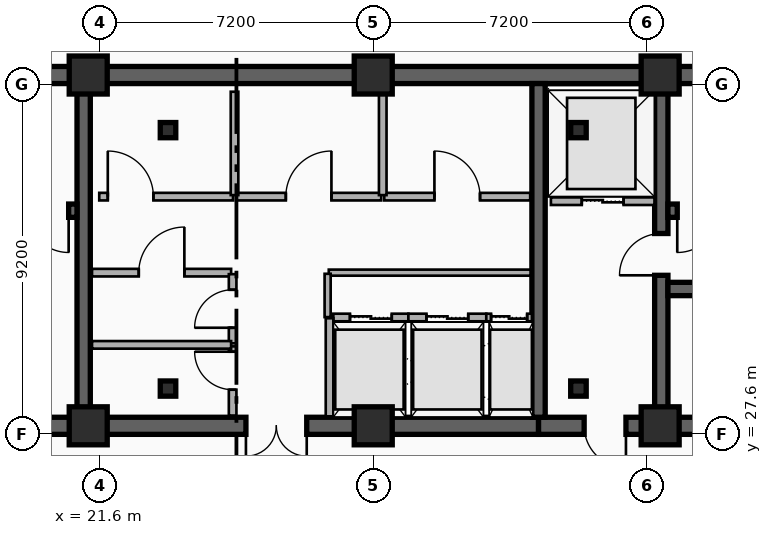
"""IFC4 building model, lengths in metres.
Left out: names, types, materials, properties, quantities, classifications, styles, units other than length and angle.
Written with IfcOpenShell. Run it as: python <this file> out.ifc"""

import sys

from ifc_helpers import new_model, si_unit, direction, frame, frame_2d, origin, origin_2d, place, context, subcontext, project, spatial, rectangle, i_section, extrude, element, fill, save


model = new_model("IFC4")
c1 = context("Model", 3, precision=1e-05, world=origin(), true_north=direction((0.0, 1.0)))
c2 = subcontext(c1, "Body", "Model", "MODEL_VIEW")
j1 = project(units=[si_unit("LENGTHUNIT", "METRE"), si_unit("PLANEANGLEUNIT", "RADIAN")], contexts=[c1])
p1 = place(None, origin())
s1 = spatial("IfcSite", under=j1, at=p1, CompositionType="ELEMENT")
p2 = place(p1, origin())
s2 = spatial("IfcBuilding", under=s1, at=p2, CompositionType="ELEMENT")
p3 = place(p2, frame((0.0, 0.0, 222.0)))
s3 = spatial("IfcBuildingStorey", under=s2, at=p3, CompositionType="ELEMENT", Elevation=222.0)
p4 = place(p3, frame((12.15, 37.05, 0.0), z_axis=(0.0, 0.0, 1.0), x_axis=(1.0, 0.0, 0.0)))
e1 = element("IfcWall", 1, at=p4, inside=s3, PredefinedType="SHEAR", context=c2, shape_type="SweptSolid", body=[
    extrude(rectangle(XDim=33.23, YDim=0.45, at=frame_2d((16.615, 0.0))), origin(), (0.0, 0.0, 1.0), 3.6),
])
p5 = place(p3, frame((21.18, 27.82, 0.0), z_axis=(0.0, 0.0, 1.0), x_axis=(-1.0, 0.0, 0.0)))
e2 = element("IfcWall", 2, at=p5, inside=s3, PredefinedType="SHEAR", context=c2, shape_type="SweptSolid", body=[
    extrude(rectangle(XDim=9.03, YDim=0.45, at=frame_2d((4.515, 0.0))), origin(), (0.0, 0.0, 1.0), 3.6),
])
p6 = place(p5, frame((2.68, 0.0, 0.0)))
e3 = element("IfcOpeningElement", 3, at=p6, cuts=e2, PredefinedType="OPENING", context=c2, shape_type="SweptSolid", body=[
    extrude(rectangle(XDim=1.1, YDim=2.15, at=frame_2d((0.55, 1.075))), frame((0.0, 0.235, 0.0), z_axis=(0.0, -1.0, 0.0), x_axis=(1.0, 0.0, 0.0)), (0.0, 0.0, 1.0), 0.47),
])
p7 = place(p3, frame((33.15, 27.82, 0.0), z_axis=(0.0, 0.0, 1.0), x_axis=(-1.0, 0.0, 0.0)))
e4 = element("IfcWall", 4, at=p7, inside=s3, PredefinedType="SHEAR", context=c2, shape_type="SweptSolid", body=[
    extrude(rectangle(XDim=11.97, YDim=0.45, at=frame_2d((5.985, 0.0))), origin(), (0.0, 0.0, 1.0), 3.6),
])
p8 = place(p7, frame((6.1, 0.0, 0.0)))
e5 = element("IfcOpeningElement", 5, at=p8, cuts=e4, PredefinedType="OPENING", context=c2, shape_type="SweptSolid", body=[
    extrude(rectangle(XDim=1.6, YDim=2.2, at=frame_2d((0.8, 1.1))), frame((0.0, 0.235, 0.0), z_axis=(0.0, -1.0, 0.0), x_axis=(1.0, 0.0, 0.0)), (0.0, 0.0, 1.0), 0.47),
])
p9 = place(p3, frame((45.38, 27.82, 0.0), z_axis=(0.0, 0.0, 1.0), x_axis=(-1.0, 0.0, 0.0)))
e6 = element("IfcWall", 6, at=p9, inside=s3, PredefinedType="SHEAR", context=c2, shape_type="SweptSolid", body=[
    extrude(rectangle(XDim=12.23, YDim=0.45, at=frame_2d((6.115, 0.0))), origin(), (0.0, 0.0, 1.0), 3.6),
])
p10 = place(p9, frame((9.93, 0.0, 0.0)))
e7 = element("IfcOpeningElement", 7, at=p10, cuts=e6, PredefinedType="OPENING", context=c2, shape_type="SweptSolid", body=[
    extrude(rectangle(XDim=1.1, YDim=2.15, at=frame_2d((0.55, 1.075))), frame((0.0, 0.235, 0.0), z_axis=(0.0, -1.0, 0.0), x_axis=(1.0, 0.0, 0.0)), (0.0, 0.0, 1.0), 0.47),
])
p11 = place(p9, frame((6.23, 0.0, 0.0)))
e8 = element("IfcOpeningElement", 8, at=p11, cuts=e6, PredefinedType="OPENING", context=c2, shape_type="SweptSolid", body=[
    extrude(rectangle(XDim=1.1, YDim=2.15, at=frame_2d((0.55, 1.075))), frame((0.0, 0.235, 0.0), z_axis=(0.0, -1.0, 0.0), x_axis=(1.0, 0.0, 0.0)), (0.0, 0.0, 1.0), 0.47),
])
for number, where, z_axis, x_axis in (
    (9, (21.18, 28.045, 0.0), (0.0, 0.0, 1.0), (0.0, 1.0, 0.0)),
    (10, (33.15, 28.045, 0.0), (0.0, 0.0, 1.0), (0.0, 1.0, 0.0)),
):
    element("IfcWall", number, at=place(p3, frame(where, z_axis=z_axis, x_axis=x_axis)), inside=s3, PredefinedType="SHEAR", context=c2, shape_type="SweptSolid", body=[
        extrude(rectangle(XDim=8.78, YDim=0.35, at=frame_2d((4.39, 0.0))), origin(), (0.0, 0.0, 1.0), 3.6),
    ])
p12 = place(p3, frame((36.38, 28.045, 0.0), z_axis=(0.0, 0.0, 1.0), x_axis=(0.0, 1.0, 0.0)))
e11 = element("IfcWall", 11, at=p12, inside=s3, PredefinedType="SHEAR", context=c2, shape_type="SweptSolid", body=[
    extrude(rectangle(XDim=8.78, YDim=0.35, at=frame_2d((4.39, 0.0))), origin(), (0.0, 0.0, 1.0), 3.6),
])
p13 = place(p12, frame((3.735, 0.0, 0.0)))
e12 = element("IfcOpeningElement", 12, at=p13, cuts=e11, PredefinedType="OPENING", context=c2, shape_type="SweptSolid", body=[
    extrude(rectangle(XDim=1.1, YDim=2.15, at=frame_2d((0.55, 1.075))), frame((0.0, 0.185, 0.0), z_axis=(0.0, -1.0, 0.0), x_axis=(1.0, 0.0, 0.0)), (0.0, 0.0, 1.0), 0.37),
])
p14 = place(p3, frame((21.005, 33.48, 0.0), z_axis=(0.0, 0.0, 1.0), x_axis=(-1.0, 0.0, 0.0)))
e13 = element("IfcWall", 13, at=p14, inside=s3, PredefinedType="SHEAR", context=c2, shape_type="SweptSolid", body=[
    extrude(rectangle(XDim=8.63, YDim=0.35, at=frame_2d((4.315, 0.0))), origin(), (0.0, 0.0, 1.0), 3.6),
])
p15 = place(p14, frame((0.22, 0.0, 0.0)))
e14 = element("IfcOpeningElement", 14, at=p15, cuts=e13, PredefinedType="OPENING", context=c2, shape_type="SweptSolid", body=[
    extrude(rectangle(XDim=1.1, YDim=2.15, at=frame_2d((0.55, 1.075))), frame((0.0, 0.185, 0.0), z_axis=(0.0, -1.0, 0.0), x_axis=(1.0, 0.0, 0.0)), (0.0, 0.0, 1.0), 0.37),
])
p16 = place(p3, frame((45.155, 33.48, 0.0), z_axis=(0.0, 0.0, 1.0), x_axis=(-1.0, 0.0, 0.0)))
e15 = element("IfcWall", 15, at=p16, inside=s3, PredefinedType="SHEAR", context=c2, shape_type="SweptSolid", body=[
    extrude(rectangle(XDim=8.6, YDim=0.35, at=frame_2d((4.3, 0.0))), origin(), (0.0, 0.0, 1.0), 3.6),
])
p17 = place(p16, frame((7.255, 0.0, 0.0)))
e16 = element("IfcOpeningElement", 16, at=p17, cuts=e15, PredefinedType="OPENING", context=c2, shape_type="SweptSolid", body=[
    extrude(rectangle(XDim=1.1, YDim=2.15, at=frame_2d((0.55, 1.075))), frame((0.0, 0.185, 0.0), z_axis=(0.0, -1.0, 0.0), x_axis=(1.0, 0.0, 0.0)), (0.0, 0.0, 1.0), 0.37),
])
p18 = place(p3, frame((36.555, 31.42, 0.0), z_axis=(0.0, 0.0, 1.0), x_axis=(1.0, 0.0, 0.0)))
e17 = element("IfcWall", 17, at=p18, inside=s3, PredefinedType="SHEAR", context=c2, shape_type="SweptSolid", body=[
    extrude(rectangle(XDim=8.6, YDim=0.35, at=frame_2d((4.3, 0.0))), origin(), (0.0, 0.0, 1.0), 3.6),
])
for number, where, z_axis, x_axis in (
    (18, (23.4, 28.8, 0.0), (0.0, 0.0, 1.0), (1.0, 0.0, 0.0)),
    (19, (34.2, 28.8, 0.0), (0.0, 0.0, 1.0), (1.0, 0.0, 0.0)),
    (20, (34.2, 35.6, 0.0), (0.0, 0.0, 1.0), (1.0, 0.0, 0.0)),
    (21, (23.4, 35.6, 0.0), (0.0, 0.0, 1.0), (1.0, 0.0, 0.0)),
):
    element("IfcColumn", number, at=place(p3, frame(where, z_axis=z_axis, x_axis=x_axis)), inside=s3, PredefinedType="COLUMN", context=c2, shape_type="SweptSolid", body=[
        extrude(i_section(OverallWidth=0.408, OverallDepth=0.4, WebThickness=0.025, FlangeThickness=0.039, FilletRadius=0.015, at=origin_2d()), origin(), (0.0, 0.0, 1.0), 3.6),
    ])
for number, where, z_axis, x_axis in (
    (22, (21.3, 27.82, 0.0), (0.0, 0.0, 1.0), (1.0, 0.0, 0.0)),
    (23, (21.3, 37.05, 0.0), (0.0, 0.0, 1.0), (1.0, 0.0, 0.0)),
    (24, (28.8, 27.82, 0.0), (0.0, 0.0, 1.0), (1.0, 0.0, 0.0)),
    (25, (28.8, 37.05, 0.0), (0.0, 0.0, 1.0), (1.0, 0.0, 0.0)),
    (26, (36.35, 27.82, 0.0), (0.0, 0.0, 1.0), (1.0, 0.0, 0.0)),
    (27, (36.35, 37.05, 0.0), (0.0, 0.0, 1.0), (1.0, 0.0, 0.0)),
):
    element("IfcColumn", number, at=place(p3, frame(where, z_axis=z_axis, x_axis=x_axis)), inside=s3, PredefinedType="COLUMN", context=c2, shape_type="SweptSolid", body=[
        extrude(rectangle(XDim=1.0, YDim=1.0, at=origin_2d()), origin(), (0.0, 0.0, 1.0), 3.6),
    ])
p19 = place(p3, frame((33.475, 33.73, 0.0), z_axis=(0.0, 0.0, 1.0), x_axis=(1.0, 0.0, 0.0)))
e28 = element("IfcWall", 28, at=p19, inside=s3, PredefinedType="PARTITIONING", context=c2, shape_type="SweptSolid", body=[
    extrude(rectangle(XDim=2.725, YDim=0.2, at=frame_2d((1.362, 0.0))), origin(), (0.0, 0.0, 1.0), 2.41),
])
p20 = place(p19, frame((0.812, 0.0, 0.0)))
e29 = element("IfcOpeningElement", 29, at=p20, cuts=e28, PredefinedType="OPENING", context=c2, shape_type="SweptSolid", body=[
    extrude(rectangle(XDim=1.1, YDim=2.15, at=frame_2d((0.55, 1.075))), frame((0.0, 0.11, 0.0), z_axis=(0.0, -1.0, 0.0), x_axis=(1.0, 0.0, 0.0)), (0.0, 0.0, 1.0), 0.22),
])
p21 = place(p3, frame((27.75, 30.67, 0.0), z_axis=(0.0, 0.0, 1.0), x_axis=(1.0, 0.0, 0.0)))
e30 = element("IfcWall", 30, at=p21, inside=s3, PredefinedType="PARTITIONING", context=c2, shape_type="SweptSolid", body=[
    extrude(rectangle(XDim=1.975, YDim=0.2, at=frame_2d((0.988, 0.0))), origin(), (0.0, 0.0, 1.0), 2.41),
])
p22 = place(p21, frame((0.438, 0.0, 0.0)))
e31 = element("IfcOpeningElement", 31, at=p22, cuts=e30, PredefinedType="OPENING", context=c2, shape_type="SweptSolid", body=[
    extrude(rectangle(XDim=1.1, YDim=2.15, at=frame_2d((0.55, 1.075))), frame((0.0, 0.11, 0.0), z_axis=(0.0, -1.0, 0.0), x_axis=(1.0, 0.0, 0.0)), (0.0, 0.0, 1.0), 0.22),
])
p23 = place(p3, frame((27.65, 28.07, 0.0), z_axis=(0.0, 0.0, 1.0), x_axis=(0.0, 1.0, 0.0)))
e32 = element("IfcWall", 32, at=p23, inside=s3, PredefinedType="PARTITIONING", context=c2, shape_type="SweptSolid", body=[
    extrude(rectangle(XDim=2.58, YDim=0.2, at=frame_2d((1.29, 0.0))), origin(), (0.0, 0.0, 1.0), 2.41),
])
p24 = place(p3, frame((29.725, 30.67, 0.0), z_axis=(0.0, 0.0, 1.0), x_axis=(1.0, 0.0, 0.0)))
e33 = element("IfcWall", 33, at=p24, inside=s3, PredefinedType="PARTITIONING", context=c2, shape_type="SweptSolid", body=[
    extrude(rectangle(XDim=2.05, YDim=0.2, at=frame_2d((1.025, 0.0))), origin(), (0.0, 0.0, 1.0), 2.72),
])
p25 = place(p24, frame((0.475, 0.0, 0.0)))
e34 = element("IfcOpeningElement", 34, at=p25, cuts=e33, PredefinedType="OPENING", context=c2, shape_type="SweptSolid", body=[
    extrude(rectangle(XDim=1.1, YDim=2.15, at=frame_2d((0.55, 1.075))), frame((0.0, 0.11, 0.0), z_axis=(0.0, -1.0, 0.0), x_axis=(1.0, 0.0, 0.0)), (0.0, 0.0, 1.0), 0.22),
])
p26 = place(p3, frame((31.775, 30.67, 0.0), z_axis=(0.0, 0.0, 1.0), x_axis=(1.0, 0.0, 0.0)))
e35 = element("IfcWall", 35, at=p26, inside=s3, PredefinedType="PARTITIONING", context=c2, shape_type="SweptSolid", body=[
    extrude(rectangle(XDim=1.2, YDim=0.2, at=frame_2d((0.6, 0.0))), origin(), (0.0, 0.0, 1.0), 2.72),
])
p27 = place(p26, frame((0.125, 0.0, 0.0)))
e36 = element("IfcOpeningElement", 36, at=p27, cuts=e35, PredefinedType="OPENING", context=c2, shape_type="SweptSolid", body=[
    extrude(rectangle(XDim=0.95, YDim=2.15, at=frame_2d((0.475, 1.075))), frame((0.0, 0.11, 0.0), z_axis=(0.0, -1.0, 0.0), x_axis=(1.0, 0.0, 0.0)), (0.0, 0.0, 1.0), 0.22),
])
p28 = place(p3, frame((21.4, 31.85, 0.0), z_axis=(0.0, 0.0, 1.0), x_axis=(1.0, 0.0, 0.0)))
e37 = element("IfcWall", 37, at=p28, inside=s3, PredefinedType="PARTITIONING", context=c2, shape_type="SweptSolid", body=[
    extrude(rectangle(XDim=3.66, YDim=0.2, at=frame_2d((1.83, 0.0))), origin(), (0.0, 0.0, 1.0), 2.41),
])
p29 = place(p28, frame((1.23, 0.0, 0.0)))
e38 = element("IfcOpeningElement", 38, at=p29, cuts=e37, PredefinedType="OPENING", context=c2, shape_type="SweptSolid", body=[
    extrude(rectangle(XDim=1.2, YDim=2.15, at=frame_2d((0.6, 1.075))), frame((0.0, 0.11, 0.0), z_axis=(0.0, -1.0, 0.0), x_axis=(1.0, 0.0, 0.0)), (0.0, 0.0, 1.0), 0.22),
])
p30 = place(p3, frame((21.59, 33.85, 0.0), z_axis=(0.0, 0.0, 1.0), x_axis=(1.0, 0.0, 0.0)))
e39 = element("IfcWall", 39, at=p30, inside=s3, PredefinedType="PARTITIONING", context=c2, shape_type="SweptSolid", body=[
    extrude(rectangle(XDim=3.52, YDim=0.2, at=frame_2d((1.76, 0.0))), origin(), (0.0, 0.0, 1.0), 2.41),
])
p31 = place(p30, frame((0.225, 0.0, 0.0)))
e40 = element("IfcOpeningElement", 40, at=p31, cuts=e39, PredefinedType="OPENING", context=c2, shape_type="SweptSolid", body=[
    extrude(rectangle(XDim=1.2, YDim=2.15, at=frame_2d((0.6, 1.075))), frame((0.0, 0.11, 0.0), z_axis=(0.0, -1.0, 0.0), x_axis=(1.0, 0.0, 0.0)), (0.0, 0.0, 1.0), 0.22),
])
p32 = place(p3, frame((25.19, 33.85, 0.0), z_axis=(0.0, 0.0, 1.0), x_axis=(1.0, 0.0, 0.0)))
e41 = element("IfcWall", 41, at=p32, inside=s3, PredefinedType="PARTITIONING", context=c2, shape_type="SweptSolid", body=[
    extrude(rectangle(XDim=3.82, YDim=0.2, at=frame_2d((1.91, 0.0))), origin(), (0.0, 0.0, 1.0), 2.41),
])
p33 = place(p32, frame((1.31, 0.0, 0.0)))
e42 = element("IfcOpeningElement", 42, at=p33, cuts=e41, PredefinedType="OPENING", context=c2, shape_type="SweptSolid", body=[
    extrude(rectangle(XDim=1.2, YDim=2.15, at=frame_2d((0.6, 1.075))), frame((0.0, 0.11, 0.0), z_axis=(0.0, -1.0, 0.0), x_axis=(1.0, 0.0, 0.0)), (0.0, 0.0, 1.0), 0.22),
])
p34 = place(p3, frame((29.09, 33.85, 0.0), z_axis=(0.0, 0.0, 1.0), x_axis=(1.0, 0.0, 0.0)))
e43 = element("IfcWall", 43, at=p34, inside=s3, PredefinedType="PARTITIONING", context=c2, shape_type="SweptSolid", body=[
    extrude(rectangle(XDim=3.84, YDim=0.2, at=frame_2d((1.92, 0.0))), origin(), (0.0, 0.0, 1.0), 2.41),
])
p35 = place(p34, frame((1.32, 0.0, 0.0)))
e44 = element("IfcOpeningElement", 44, at=p35, cuts=e43, PredefinedType="OPENING", context=c2, shape_type="SweptSolid", body=[
    extrude(rectangle(XDim=1.2, YDim=2.15, at=frame_2d((0.6, 1.075))), frame((0.0, 0.11, 0.0), z_axis=(0.0, -1.0, 0.0), x_axis=(1.0, 0.0, 0.0)), (0.0, 0.0, 1.0), 0.22),
])
p36 = place(p3, frame((25.1, 28.09, 0.0), z_axis=(0.0, 0.0, 1.0), x_axis=(0.0, 1.0, 0.0)))
e45 = element("IfcWall", 45, at=p36, inside=s3, PredefinedType="PARTITIONING", context=c2, shape_type="SweptSolid", body=[
    extrude(rectangle(XDim=1.82, YDim=0.2, at=frame_2d((0.91, 0.0))), origin(), (0.0, 0.0, 1.0), 2.72),
])
p37 = place(p36, frame((0.68, 0.0, 0.0)))
e46 = element("IfcOpeningElement", 46, at=p37, cuts=e45, PredefinedType="OPENING", context=c2, shape_type="SweptSolid", body=[
    extrude(rectangle(XDim=1.0, YDim=2.15, at=frame_2d((0.5, 1.075))), frame((0.0, 0.11, 0.0), z_axis=(0.0, -1.0, 0.0), x_axis=(1.0, 0.0, 0.0)), (0.0, 0.0, 1.0), 0.22),
])
p38 = place(p3, frame((25.1, 29.99, 0.0), z_axis=(0.0, 0.0, 1.0), x_axis=(0.0, 1.0, 0.0)))
e47 = element("IfcWall", 47, at=p38, inside=s3, PredefinedType="PARTITIONING", context=c2, shape_type="SweptSolid", body=[
    extrude(rectangle(XDim=1.82, YDim=0.2, at=frame_2d((0.91, 0.0))), origin(), (0.0, 0.0, 1.0), 3.34),
])
p39 = place(p38, frame((0.41, 0.0, 0.0)))
e48 = element("IfcOpeningElement", 48, at=p39, cuts=e47, PredefinedType="OPENING", context=c2, shape_type="SweptSolid", body=[
    extrude(rectangle(XDim=1.0, YDim=2.15, at=frame_2d((0.5, 1.075))), frame((0.0, 0.11, 0.0), z_axis=(0.0, -1.0, 0.0), x_axis=(1.0, 0.0, 0.0)), (0.0, 0.0, 1.0), 0.22),
])
p40 = place(p3, frame((21.4, 29.95, 0.0), z_axis=(0.0, 0.0, 1.0), x_axis=(1.0, 0.0, 0.0)))
e49 = element("IfcWall", 49, at=p40, inside=s3, PredefinedType="PARTITIONING", context=c2, shape_type="SweptSolid", body=[
    extrude(rectangle(XDim=3.66, YDim=0.2, at=frame_2d((1.83, 0.0))), origin(), (0.0, 0.0, 1.0), 2.41),
])
p41 = place(p3, frame((25.15, 33.89, 0.0), z_axis=(0.0, 0.0, 1.0), x_axis=(0.0, 1.0, 0.0)))
e50 = element("IfcWall", 50, at=p41, inside=s3, PredefinedType="PARTITIONING", context=c2, shape_type="SweptSolid", body=[
    extrude(rectangle(XDim=2.72, YDim=0.2, at=frame_2d((1.36, 0.0))), origin(), (0.0, 0.0, 1.0), 3.34),
])
p42 = place(p3, frame((29.05, 33.89, 0.0), z_axis=(0.0, 0.0, 1.0), x_axis=(0.0, 1.0, 0.0)))
e51 = element("IfcWall", 51, at=p42, inside=s3, PredefinedType="PARTITIONING", context=c2, shape_type="SweptSolid", body=[
    extrude(rectangle(XDim=2.72, YDim=0.2, at=frame_2d((1.36, 0.0))), origin(), (0.0, 0.0, 1.0), 2.41),
])
p43 = place(p3, frame((27.63, 31.85, 0.0), z_axis=(0.0, 0.0, 1.0), x_axis=(1.0, 0.0, 0.0)))
e52 = element("IfcWall", 52, at=p43, inside=s3, PredefinedType="PARTITIONING", context=c2, shape_type="SweptSolid", body=[
    extrude(rectangle(XDim=5.31, YDim=0.16, at=frame_2d((2.655, 0.0))), origin(), (0.0, 0.0, 1.0), 2.41),
])
p44 = place(p3, frame((27.6, 30.68, 0.0), z_axis=(0.0, 0.0, 1.0), x_axis=(0.0, 1.0, 0.0)))
e53 = element("IfcWall", 53, at=p44, inside=s3, PredefinedType="PARTITIONING", context=c2, shape_type="SweptSolid", body=[
    extrude(rectangle(XDim=1.14, YDim=0.16, at=frame_2d((0.57, 0.0))), origin(), (0.0, 0.0, 1.0), 3.34),
])
p45 = place(p20, origin())
e54 = element("IfcDoor", 54, at=p45, inside=s3, OperationType="DOUBLE_DOOR_SLIDING", PredefinedType="DOOR", context=c2, shape_type="SweptSolid", body=[
    extrude(rectangle(XDim=1.1, YDim=2.15, at=frame_2d((0.55, 1.075))), frame((0.0, 0.025, 0.0), z_axis=(0.0, -1.0, 0.0), x_axis=(1.0, 0.0, 0.0)), (0.0, 0.0, 1.0), 0.05),
])
fill(e29, e54)
p46 = place(p22, origin())
e55 = element("IfcDoor", 55, at=p46, inside=s3, OperationType="DOUBLE_DOOR_SLIDING", PredefinedType="DOOR", context=c2, shape_type="SweptSolid", body=[
    extrude(rectangle(XDim=1.1, YDim=2.15, at=frame_2d((0.55, 1.075))), frame((0.0, 0.025, 0.0), z_axis=(0.0, -1.0, 0.0), x_axis=(1.0, 0.0, 0.0)), (0.0, 0.0, 1.0), 0.05),
])
fill(e31, e55)
p47 = place(p25, origin())
e56 = element("IfcDoor", 56, at=p47, inside=s3, OperationType="DOUBLE_DOOR_SLIDING", PredefinedType="DOOR", context=c2, shape_type="SweptSolid", body=[
    extrude(rectangle(XDim=1.1, YDim=2.15, at=frame_2d((0.55, 1.075))), frame((0.0, 0.025, 0.0), z_axis=(0.0, -1.0, 0.0), x_axis=(1.0, 0.0, 0.0)), (0.0, 0.0, 1.0), 0.05),
])
fill(e34, e56)
p48 = place(p27, origin())
e57 = element("IfcDoor", 57, at=p48, inside=s3, OperationType="DOUBLE_DOOR_SLIDING", PredefinedType="DOOR", context=c2, shape_type="SweptSolid", body=[
    extrude(rectangle(XDim=0.95, YDim=2.15, at=frame_2d((0.475, 1.075))), frame((0.0, 0.025, 0.0), z_axis=(0.0, -1.0, 0.0), x_axis=(1.0, 0.0, 0.0)), (0.0, 0.0, 1.0), 0.05),
])
fill(e36, e57)
p49 = place(p15, origin())
e58 = element("IfcDoor", 58, at=p49, inside=s3, OperationType="SINGLE_SWING_LEFT", PredefinedType="DOOR", context=c2, shape_type="SweptSolid", body=[
    extrude(rectangle(XDim=1.1, YDim=2.15, at=frame_2d((0.55, 1.075))), frame((0.0, 0.025, 0.0), z_axis=(0.0, -1.0, 0.0), x_axis=(1.0, 0.0, 0.0)), (0.0, 0.0, 1.0), 0.05),
])
fill(e14, e58)
p50 = place(p17, origin())
e59 = element("IfcDoor", 59, at=p50, inside=s3, OperationType="SINGLE_SWING_RIGHT", PredefinedType="DOOR", context=c2, shape_type="SweptSolid", body=[
    extrude(rectangle(XDim=1.1, YDim=2.15, at=frame_2d((0.55, 1.075))), frame((0.0, 0.025, 0.0), z_axis=(0.0, -1.0, 0.0), x_axis=(1.0, 0.0, 0.0)), (0.0, 0.0, 1.0), 0.05),
])
fill(e16, e59)
p51 = place(p13, origin())
e60 = element("IfcDoor", 60, at=p51, inside=s3, OperationType="SINGLE_SWING_LEFT", PredefinedType="DOOR", context=c2, shape_type="SweptSolid", body=[
    extrude(rectangle(XDim=1.1, YDim=2.15, at=frame_2d((0.55, 1.075))), frame((0.0, 0.025, 0.0), z_axis=(0.0, -1.0, 0.0), x_axis=(1.0, 0.0, 0.0)), (0.0, 0.0, 1.0), 0.05),
])
fill(e12, e60)
p52 = place(p10, origin())
e61 = element("IfcDoor", 61, at=p52, inside=s3, OperationType="SINGLE_SWING_LEFT", PredefinedType="DOOR", context=c2, shape_type="SweptSolid", body=[
    extrude(rectangle(XDim=1.1, YDim=2.15, at=frame_2d((0.55, 1.075))), frame((0.0, 0.025, 0.0), z_axis=(0.0, -1.0, 0.0), x_axis=(1.0, 0.0, 0.0)), (0.0, 0.0, 1.0), 0.05),
])
fill(e7, e61)
p53 = place(p8, origin())
e62 = element("IfcDoor", 62, at=p53, inside=s3, OperationType="SINGLE_SWING_LEFT", PredefinedType="DOOR", context=c2, shape_type="SweptSolid", body=[
    extrude(rectangle(XDim=1.6, YDim=2.2, at=frame_2d((0.8, 1.1))), frame((0.0, 0.025, 0.0), z_axis=(0.0, -1.0, 0.0), x_axis=(1.0, 0.0, 0.0)), (0.0, 0.0, 1.0), 0.05),
])
fill(e5, e62)
p54 = place(p29, origin())
e63 = element("IfcDoor", 63, at=p54, inside=s3, OperationType="SINGLE_SWING_RIGHT", PredefinedType="DOOR", context=c2, shape_type="SweptSolid", body=[
    extrude(rectangle(XDim=1.2, YDim=2.15, at=frame_2d((0.6, 1.075))), frame((0.0, 0.025, 0.0), z_axis=(0.0, -1.0, 0.0), x_axis=(1.0, 0.0, 0.0)), (0.0, 0.0, 1.0), 0.05),
])
fill(e38, e63)
p55 = place(p31, origin())
e64 = element("IfcDoor", 64, at=p55, inside=s3, OperationType="SINGLE_SWING_LEFT", PredefinedType="DOOR", context=c2, shape_type="SweptSolid", body=[
    extrude(rectangle(XDim=1.2, YDim=2.15, at=frame_2d((0.6, 1.075))), frame((0.0, 0.025, 0.0), z_axis=(0.0, -1.0, 0.0), x_axis=(1.0, 0.0, 0.0)), (0.0, 0.0, 1.0), 0.05),
])
fill(e40, e64)
p56 = place(p33, origin())
e65 = element("IfcDoor", 65, at=p56, inside=s3, OperationType="SINGLE_SWING_RIGHT", PredefinedType="DOOR", context=c2, shape_type="SweptSolid", body=[
    extrude(rectangle(XDim=1.2, YDim=2.15, at=frame_2d((0.6, 1.075))), frame((0.0, 0.025, 0.0), z_axis=(0.0, -1.0, 0.0), x_axis=(1.0, 0.0, 0.0)), (0.0, 0.0, 1.0), 0.05),
])
fill(e42, e65)
p57 = place(p35, origin())
e66 = element("IfcDoor", 66, at=p57, inside=s3, OperationType="SINGLE_SWING_LEFT", PredefinedType="DOOR", context=c2, shape_type="SweptSolid", body=[
    extrude(rectangle(XDim=1.2, YDim=2.15, at=frame_2d((0.6, 1.075))), frame((0.0, 0.025, 0.0), z_axis=(0.0, -1.0, 0.0), x_axis=(1.0, 0.0, 0.0)), (0.0, 0.0, 1.0), 0.05),
])
fill(e44, e66)
p58 = place(p37, origin())
e67 = element("IfcDoor", 67, at=p58, inside=s3, OperationType="SINGLE_SWING_RIGHT", PredefinedType="DOOR", context=c2, shape_type="SweptSolid", body=[
    extrude(rectangle(XDim=1.0, YDim=2.15, at=frame_2d((0.5, 1.075))), frame((0.0, 0.025, 0.0), z_axis=(0.0, -1.0, 0.0), x_axis=(1.0, 0.0, 0.0)), (0.0, 0.0, 1.0), 0.05),
])
fill(e46, e67)
p59 = place(p39, origin())
e68 = element("IfcDoor", 68, at=p59, inside=s3, OperationType="SINGLE_SWING_LEFT", PredefinedType="DOOR", context=c2, shape_type="SweptSolid", body=[
    extrude(rectangle(XDim=1.0, YDim=2.15, at=frame_2d((0.5, 1.075))), frame((0.0, 0.025, 0.0), z_axis=(0.0, -1.0, 0.0), x_axis=(1.0, 0.0, 0.0)), (0.0, 0.0, 1.0), 0.05),
])
fill(e48, e68)
save(model, sys.argv[1])
